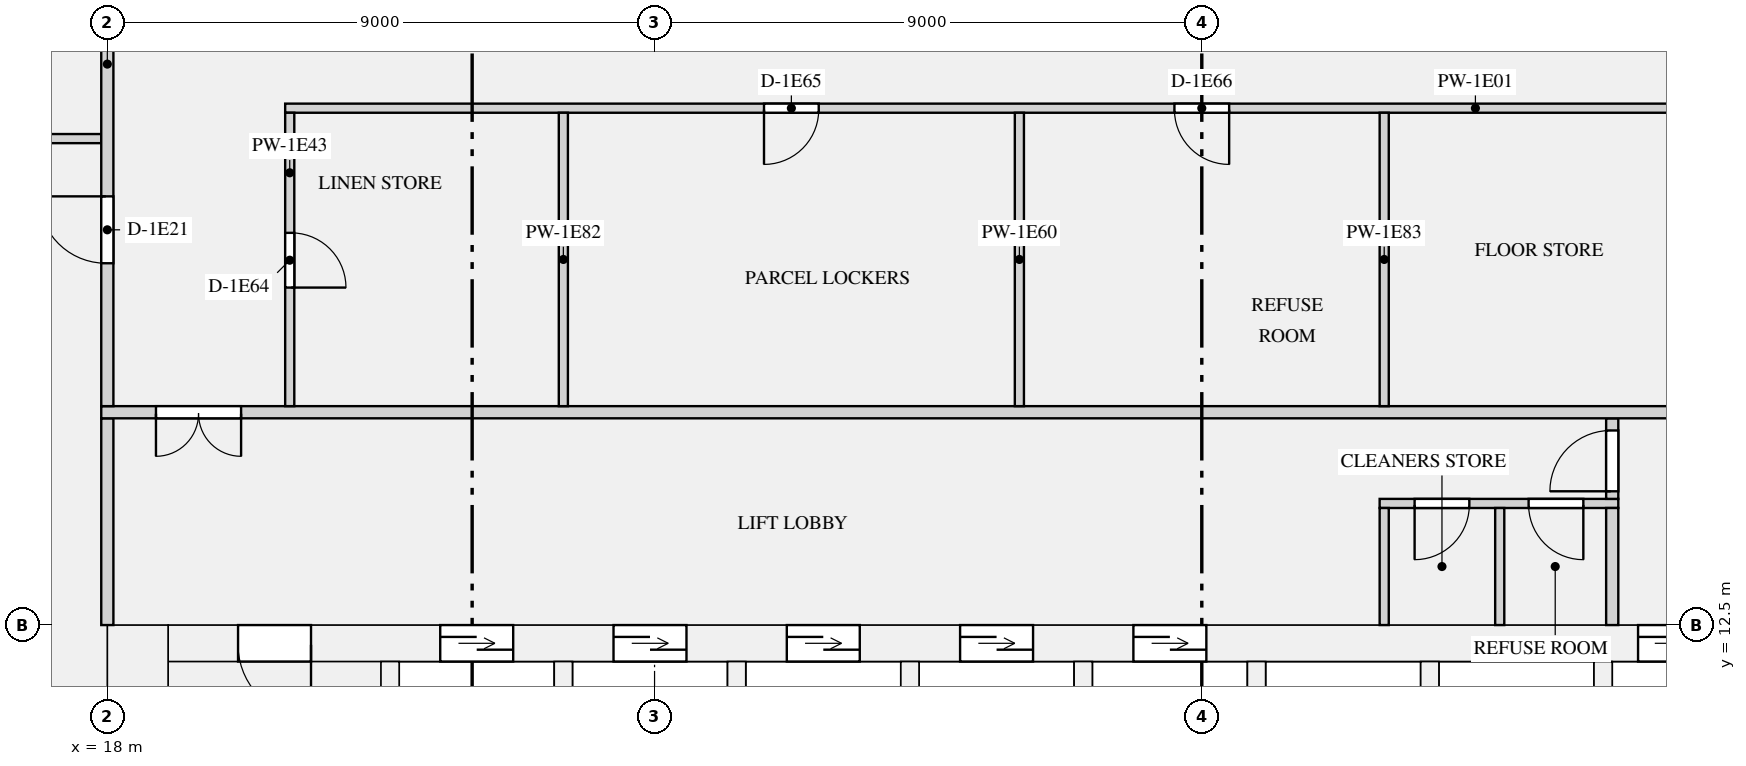
"""IFC4 building model, lengths in metres.
Left out: names, types, materials, properties, quantities, classifications, styles, units other than length and angle.
Written with IfcOpenShell. Run it as: python <this file> out.ifc"""

import sys

from ifc_helpers import new_model, si_unit, direction, frame, frame_2d, origin, place, context, subcontext, project, spatial, rectangle, extrude, element, fill, save


model = new_model("IFC4")
c1 = context("Model", 3, precision=1e-05, world=origin(), true_north=direction((0.0, 1.0)))
c2 = subcontext(c1, "Body", "Model", "MODEL_VIEW")
j1 = project(units=[si_unit("LENGTHUNIT", "METRE"), si_unit("PLANEANGLEUNIT", "RADIAN")], contexts=[c1])
p1 = place(None, origin())
s1 = spatial("IfcSite", under=j1, at=p1, CompositionType="ELEMENT")
p2 = place(p1, origin())
s2 = spatial("IfcBuilding", under=s1, at=p2, CompositionType="ELEMENT")
p3 = place(p2, frame((0.0, 0.0, 54.15)))
s3 = spatial("IfcBuildingStorey", under=s2, at=p3, CompositionType="ELEMENT", Elevation=54.15)
p4 = place(p3, frame((18.5, 0.0, 0.0), z_axis=(0.0, 0.0, 1.0), x_axis=(0.0, 1.0, 0.0)))
e1 = element("IfcWall", 1, at=p4, inside=s3, PredefinedType="SHEAR", context=c2, shape_type="SweptSolid", body=[
    extrude(rectangle(XDim=12.5, YDim=1.0, at=frame_2d((6.25, 0.0))), origin(), (0.0, 0.0, 1.0), 3.15),
])
p5 = place(p3, frame((19.0, 12.2, 0.0), z_axis=(0.0, 0.0, 1.0), x_axis=(1.0, 0.0, 0.0)))
e2 = element("IfcWall", 2, at=p5, inside=s3, PredefinedType="SHEAR", context=c2, shape_type="SweptSolid", body=[
    extrude(rectangle(XDim=34.0, YDim=0.6, at=frame_2d((17.0, 0.0))), origin(), (0.0, 0.0, 1.0), 3.15),
])
p6 = place(p5, frame((4.475, 0.0, 0.0)))
e3 = element("IfcOpeningElement", 3, at=p6, cuts=e2, PredefinedType="OPENING", context=c2, shape_type="SweptSolid", body=[
    extrude(rectangle(XDim=1.2, YDim=2.1, at=frame_2d((0.6, 1.05))), frame((0.0, 0.31, 0.0), z_axis=(0.0, -1.0, 0.0), x_axis=(1.0, 0.0, 0.0)), (0.0, 0.0, 1.0), 0.62),
])
p7 = place(p5, frame((7.325, 0.0, 0.0)))
e4 = element("IfcOpeningElement", 4, at=p7, cuts=e2, PredefinedType="OPENING", context=c2, shape_type="SweptSolid", body=[
    extrude(rectangle(XDim=1.2, YDim=2.1, at=frame_2d((0.6, 1.05))), frame((0.0, 0.31, 0.0), z_axis=(0.0, -1.0, 0.0), x_axis=(1.0, 0.0, 0.0)), (0.0, 0.0, 1.0), 0.62),
])
p8 = place(p5, frame((10.175, 0.0, 0.0)))
e5 = element("IfcOpeningElement", 5, at=p8, cuts=e2, PredefinedType="OPENING", context=c2, shape_type="SweptSolid", body=[
    extrude(rectangle(XDim=1.2, YDim=2.1, at=frame_2d((0.6, 1.05))), frame((0.0, 0.31, 0.0), z_axis=(0.0, -1.0, 0.0), x_axis=(1.0, 0.0, 0.0)), (0.0, 0.0, 1.0), 0.62),
])
p9 = place(p5, frame((13.025, 0.0, 0.0)))
e6 = element("IfcOpeningElement", 6, at=p9, cuts=e2, PredefinedType="OPENING", context=c2, shape_type="SweptSolid", body=[
    extrude(rectangle(XDim=1.2, YDim=2.1, at=frame_2d((0.6, 1.05))), frame((0.0, 0.31, 0.0), z_axis=(0.0, -1.0, 0.0), x_axis=(1.0, 0.0, 0.0)), (0.0, 0.0, 1.0), 0.62),
])
p10 = place(p5, frame((15.875, 0.0, 0.0)))
e7 = element("IfcOpeningElement", 7, at=p10, cuts=e2, PredefinedType="OPENING", context=c2, shape_type="SweptSolid", body=[
    extrude(rectangle(XDim=1.2, YDim=2.1, at=frame_2d((0.6, 1.05))), frame((0.0, 0.31, 0.0), z_axis=(0.0, -1.0, 0.0), x_axis=(1.0, 0.0, 0.0)), (0.0, 0.0, 1.0), 0.62),
])
p11 = place(p5, frame((24.175, 0.0, 0.0)))
e8 = element("IfcOpeningElement", 8, at=p11, cuts=e2, PredefinedType="OPENING", context=c2, shape_type="SweptSolid", body=[
    extrude(rectangle(XDim=1.1, YDim=2.1, at=frame_2d((0.55, 1.05))), frame((0.0, 0.31, 0.0), z_axis=(0.0, -1.0, 0.0), x_axis=(1.0, 0.0, 0.0)), (0.0, 0.0, 1.0), 0.62),
])
p12 = place(p5, frame((26.425, 0.0, 0.0)))
e9 = element("IfcOpeningElement", 9, at=p12, cuts=e2, PredefinedType="OPENING", context=c2, shape_type="SweptSolid", body=[
    extrude(rectangle(XDim=1.1, YDim=2.1, at=frame_2d((0.55, 1.05))), frame((0.0, 0.31, 0.0), z_axis=(0.0, -1.0, 0.0), x_axis=(1.0, 0.0, 0.0)), (0.0, 0.0, 1.0), 0.62),
])
p13 = place(p5, frame((28.675, 0.0, 0.0)))
e10 = element("IfcOpeningElement", 10, at=p13, cuts=e2, PredefinedType="OPENING", context=c2, shape_type="SweptSolid", body=[
    extrude(rectangle(XDim=1.1, YDim=2.1, at=frame_2d((0.55, 1.05))), frame((0.0, 0.31, 0.0), z_axis=(0.0, -1.0, 0.0), x_axis=(1.0, 0.0, 0.0)), (0.0, 0.0, 1.0), 0.62),
])
p14 = place(p5, frame((1.15, 0.0, 0.0)))
e11 = element("IfcOpeningElement", 11, at=p14, cuts=e2, PredefinedType="OPENING", context=c2, shape_type="SweptSolid", body=[
    extrude(rectangle(XDim=1.2, YDim=2.1, at=frame_2d((0.6, 1.05))), frame((0.0, 0.31, 0.0), z_axis=(0.0, -1.0, 0.0), x_axis=(1.0, 0.0, 0.0)), (0.0, 0.0, 1.0), 0.62),
])
p15 = place(p5, frame((31.65, 0.0, 0.0)))
e12 = element("IfcOpeningElement", 12, at=p15, cuts=e2, PredefinedType="OPENING", context=c2, shape_type="SweptSolid", body=[
    extrude(rectangle(XDim=1.2, YDim=2.1, at=frame_2d((0.6, 1.05))), frame((0.0, 0.31, 0.0), z_axis=(0.0, -1.0, 0.0), x_axis=(1.0, 0.0, 0.0)), (0.0, 0.0, 1.0), 0.62),
])
for number, where, z_axis, x_axis in (
    (13, (22.65, 9.35, 0.0), (0.0, 0.0, 1.0), (0.0, 1.0, 0.0)),
    (14, (25.5, 9.35, 0.0), (0.0, 0.0, 1.0), (0.0, 1.0, 0.0)),
    (15, (28.35, 9.35, 0.0), (0.0, 0.0, 1.0), (0.0, 1.0, 0.0)),
    (16, (31.2, 9.35, 0.0), (0.0, 0.0, 1.0), (0.0, 1.0, 0.0)),
    (17, (34.05, 9.35, 0.0), (0.0, 0.0, 1.0), (0.0, 1.0, 0.0)),
    (18, (36.9, 9.35, 0.0), (0.0, 0.0, 1.0), (0.0, 1.0, 0.0)),
    (19, (39.75, 9.35, 0.0), (0.0, 0.0, 1.0), (0.0, 1.0, 0.0)),
):
    element("IfcWall", number, at=place(p3, frame(where, z_axis=z_axis, x_axis=x_axis)), inside=s3, PredefinedType="SHEAR", context=c2, shape_type="SweptSolid", body=[
        extrude(rectangle(XDim=2.55, YDim=0.3, at=frame_2d((1.275, 0.0))), origin(), (0.0, 0.0, 1.0), 3.15),
    ])
p16 = place(p3, frame((42.6, 8.25, 0.0), z_axis=(0.0, 0.0, 1.0), x_axis=(0.0, 1.0, 0.0)))
e20 = element("IfcWall", 20, at=p16, inside=s3, PredefinedType="SHEAR", context=c2, shape_type="SweptSolid", body=[
    extrude(rectangle(XDim=3.65, YDim=0.3, at=frame_2d((1.825, 0.0))), origin(), (0.0, 0.0, 1.0), 3.15),
])
p17 = place(p3, frame((38.925, 14.5, 0.0), z_axis=(0.0, 0.0, 1.0), x_axis=(1.0, 0.0, 0.0)))
e21 = element("IfcWall", 21, at=p17, inside=s3, PredefinedType="PARTITIONING", context=c2, shape_type="SweptSolid", body=[
    extrude(rectangle(XDim=3.925, YDim=0.15, at=frame_2d((1.962, 0.0))), origin(), (0.0, 0.0, 1.0), 2.83),
])
p18 = place(p17, frame((0.575, 0.0, 0.0)))
e22 = element("IfcOpeningElement", 22, at=p18, cuts=e21, PredefinedType="OPENING", context=c2, shape_type="SweptSolid", body=[
    extrude(rectangle(XDim=0.9, YDim=2.1, at=frame_2d((0.45, 1.05))), frame((0.0, 0.085, 0.0), z_axis=(0.0, -1.0, 0.0), x_axis=(1.0, 0.0, 0.0)), (0.0, 0.0, 1.0), 0.17),
])
p19 = place(p17, frame((2.45, 0.0, 0.0)))
e23 = element("IfcOpeningElement", 23, at=p19, cuts=e21, PredefinedType="OPENING", context=c2, shape_type="SweptSolid", body=[
    extrude(rectangle(XDim=0.9, YDim=2.1, at=frame_2d((0.45, 1.05))), frame((0.0, 0.085, 0.0), z_axis=(0.0, -1.0, 0.0), x_axis=(1.0, 0.0, 0.0)), (0.0, 0.0, 1.0), 0.17),
])
p20 = place(p3, frame((18.0, 12.5, 0.0), z_axis=(0.0, 0.0, 1.0), x_axis=(0.0, 1.0, 0.0)))
e24 = element("IfcWall", 24, at=p20, inside=s3, PredefinedType="PARTITIONING", context=c2, shape_type="SweptSolid", body=[
    extrude(rectangle(XDim=3.4, YDim=0.2, at=frame_2d((1.7, 0.0))), origin(), (0.0, 0.0, 1.0), 2.83),
])
for number, where, z_axis, x_axis in (
    (25, (39.0, 12.5, 0.0), (0.0, 0.0, 1.0), (0.0, 1.0, 0.0)),
    (26, (40.9, 12.5, 0.0), (0.0, 0.0, 1.0), (0.0, 1.0, 0.0)),
):
    element("IfcWall", number, at=place(p3, frame(where, z_axis=z_axis, x_axis=x_axis)), inside=s3, PredefinedType="PARTITIONING", context=c2, shape_type="SweptSolid", body=[
        extrude(rectangle(XDim=1.925, YDim=0.15, at=frame_2d((0.962, 0.0))), origin(), (0.0, 0.0, 1.0), 2.83),
    ])
p21 = place(p3, frame((42.75, 12.5, 0.0), z_axis=(0.0, 0.0, 1.0), x_axis=(0.0, 1.0, 0.0)))
e27 = element("IfcWall", 27, at=p21, inside=s3, PredefinedType="PARTITIONING", context=c2, shape_type="SweptSolid", body=[
    extrude(rectangle(XDim=1.925, YDim=0.2, at=frame_2d((0.962, 0.0))), origin(), (0.0, 0.0, 1.0), 2.83),
])
p22 = place(p3, frame((42.75, 14.575, 0.0), z_axis=(0.0, 0.0, 1.0), x_axis=(0.0, 1.0, 0.0)))
e28 = element("IfcWall", 28, at=p22, inside=s3, PredefinedType="PARTITIONING", context=c2, shape_type="SweptSolid", body=[
    extrude(rectangle(XDim=1.325, YDim=0.2, at=frame_2d((0.663, 0.0))), origin(), (0.0, 0.0, 1.0), 2.83),
])
p23 = place(p22, frame((0.125, 0.0, 0.0)))
e29 = element("IfcOpeningElement", 29, at=p23, cuts=e28, PredefinedType="OPENING", context=c2, shape_type="SweptSolid", body=[
    extrude(rectangle(XDim=1.0, YDim=2.1, at=frame_2d((0.5, 1.05))), frame((0.0, 0.11, 0.0), z_axis=(0.0, -1.0, 0.0), x_axis=(1.0, 0.0, 0.0)), (0.0, 0.0, 1.0), 0.22),
])
p24 = place(p3, frame((20.925, 21.0, 0.0), z_axis=(0.0, 0.0, 1.0), x_axis=(1.0, 0.0, 0.0)))
e30 = element("IfcWall", 30, at=p24, inside=s3, PredefinedType="PARTITIONING", context=c2, shape_type="SweptSolid", body=[
    extrude(rectangle(XDim=30.15, YDim=0.15, at=frame_2d((15.075, 0.0))), origin(), (0.0, 0.0, 1.0), 2.83),
])
p25 = place(p24, frame((7.875, 0.0, 0.0)))
e31 = element("IfcOpeningElement", 31, at=p25, cuts=e30, PredefinedType="OPENING", context=c2, shape_type="SweptSolid", body=[
    extrude(rectangle(XDim=0.9, YDim=2.1, at=frame_2d((0.45, 1.05))), frame((0.0, 0.085, 0.0), z_axis=(0.0, -1.0, 0.0), x_axis=(1.0, 0.0, 0.0)), (0.0, 0.0, 1.0), 0.17),
])
p26 = place(p24, frame((14.625, 0.0, 0.0)))
e32 = element("IfcOpeningElement", 32, at=p26, cuts=e30, PredefinedType="OPENING", context=c2, shape_type="SweptSolid", body=[
    extrude(rectangle(XDim=0.9, YDim=2.1, at=frame_2d((0.45, 1.05))), frame((0.0, 0.085, 0.0), z_axis=(0.0, -1.0, 0.0), x_axis=(1.0, 0.0, 0.0)), (0.0, 0.0, 1.0), 0.17),
])
p27 = place(p24, frame((23.625, 0.0, 0.0)))
e33 = element("IfcOpeningElement", 33, at=p27, cuts=e30, PredefinedType="OPENING", context=c2, shape_type="SweptSolid", body=[
    extrude(rectangle(XDim=0.9, YDim=2.1, at=frame_2d((0.45, 1.05))), frame((0.0, 0.085, 0.0), z_axis=(0.0, -1.0, 0.0), x_axis=(1.0, 0.0, 0.0)), (0.0, 0.0, 1.0), 0.17),
])
p28 = place(p3, frame((13.575, 20.5, 0.0), z_axis=(0.0, 0.0, 1.0), x_axis=(1.0, 0.0, 0.0)))
e34 = element("IfcWall", 34, at=p28, inside=s3, PredefinedType="PARTITIONING", context=c2, shape_type="SweptSolid", body=[
    extrude(rectangle(XDim=4.325, YDim=0.15, at=frame_2d((2.163, 0.0))), origin(), (0.0, 0.0, 1.0), 2.83),
])
p29 = place(p28, frame((1.725, 0.0, 0.0)))
e35 = element("IfcOpeningElement", 35, at=p29, cuts=e34, PredefinedType="OPENING", context=c2, shape_type="SweptSolid", body=[
    extrude(rectangle(XDim=0.9, YDim=2.1, at=frame_2d((0.45, 1.05))), frame((0.0, 0.085, 0.0), z_axis=(0.0, -1.0, 0.0), x_axis=(1.0, 0.0, 0.0)), (0.0, 0.0, 1.0), 0.17),
])
p30 = place(p3, frame((17.9, 16.0, 0.0), z_axis=(0.0, 0.0, 1.0), x_axis=(1.0, 0.0, 0.0)))
e36 = element("IfcWall", 36, at=p30, inside=s3, PredefinedType="PARTITIONING", context=c2, shape_type="SweptSolid", body=[
    extrude(rectangle(XDim=36.2, YDim=0.2, at=frame_2d((18.1, 0.0))), origin(), (0.0, 0.0, 1.0), 2.83),
])
p31 = place(p30, frame((0.9, 0.0, 0.0)))
e37 = element("IfcOpeningElement", 37, at=p31, cuts=e36, PredefinedType="OPENING", context=c2, shape_type="SweptSolid", body=[
    extrude(rectangle(XDim=1.4, YDim=2.1, at=frame_2d((0.7, 1.05))), frame((0.0, 0.11, 0.0), z_axis=(0.0, -1.0, 0.0), x_axis=(1.0, 0.0, 0.0)), (0.0, 0.0, 1.0), 0.22),
])
p32 = place(p30, frame((33.9, 0.0, 0.0)))
e38 = element("IfcOpeningElement", 38, at=p32, cuts=e36, PredefinedType="OPENING", context=c2, shape_type="SweptSolid", body=[
    extrude(rectangle(XDim=1.4, YDim=2.1, at=frame_2d((0.7, 1.05))), frame((0.0, 0.11, 0.0), z_axis=(0.0, -1.0, 0.0), x_axis=(1.0, 0.0, 0.0)), (0.0, 0.0, 1.0), 0.22),
])
p33 = place(p3, frame((18.0, 16.1, 0.0), z_axis=(0.0, 0.0, 1.0), x_axis=(0.0, 1.0, 0.0)))
e39 = element("IfcWall", 39, at=p33, inside=s3, PredefinedType="PARTITIONING", context=c2, shape_type="SweptSolid", body=[
    extrude(rectangle(XDim=7.8, YDim=0.2, at=frame_2d((3.9, 0.0))), origin(), (0.0, 0.0, 1.0), 2.83),
])
p34 = place(p33, frame((2.35, 0.0, 0.0)))
e40 = element("IfcOpeningElement", 40, at=p34, cuts=e39, PredefinedType="OPENING", context=c2, shape_type="SweptSolid", body=[
    extrude(rectangle(XDim=1.1, YDim=2.1, at=frame_2d((0.55, 1.05))), frame((0.0, 0.11, 0.0), z_axis=(0.0, -1.0, 0.0), x_axis=(1.0, 0.0, 0.0)), (0.0, 0.0, 1.0), 0.22),
])
p35 = place(p3, frame((21.0, 16.1, 0.0), z_axis=(0.0, 0.0, 1.0), x_axis=(0.0, 1.0, 0.0)))
e41 = element("IfcWall", 41, at=p35, inside=s3, PredefinedType="PARTITIONING", context=c2, shape_type="SweptSolid", body=[
    extrude(rectangle(XDim=4.825, YDim=0.15, at=frame_2d((2.413, 0.0))), origin(), (0.0, 0.0, 1.0), 2.83),
])
p36 = place(p35, frame((1.95, 0.0, 0.0)))
e42 = element("IfcOpeningElement", 42, at=p36, cuts=e41, PredefinedType="OPENING", context=c2, shape_type="SweptSolid", body=[
    extrude(rectangle(XDim=0.9, YDim=2.1, at=frame_2d((0.45, 1.05))), frame((0.0, 0.085, 0.0), z_axis=(0.0, -1.0, 0.0), x_axis=(1.0, 0.0, 0.0)), (0.0, 0.0, 1.0), 0.17),
])
for number, where, z_axis, x_axis in (
    (43, (33.0, 16.1, 0.0), (0.0, 0.0, 1.0), (0.0, 1.0, 0.0)),
    (44, (25.5, 16.1, 0.0), (0.0, 0.0, 1.0), (0.0, 1.0, 0.0)),
    (45, (39.0, 16.1, 0.0), (0.0, 0.0, 1.0), (0.0, 1.0, 0.0)),
):
    element("IfcWall", number, at=place(p3, frame(where, z_axis=z_axis, x_axis=x_axis)), inside=s3, PredefinedType="PARTITIONING", context=c2, shape_type="SweptSolid", body=[
        extrude(rectangle(XDim=4.825, YDim=0.15, at=frame_2d((2.413, 0.0))), origin(), (0.0, 0.0, 1.0), 2.83),
    ])
p37 = place(p6, origin())
e46 = element("IfcDoor", 46, at=p37, inside=s3, OperationType="DOUBLE_DOOR_SLIDING", PredefinedType="DOOR", context=c2, shape_type="SweptSolid", body=[
    extrude(rectangle(XDim=1.2, YDim=2.1, at=frame_2d((0.6, 1.05))), frame((0.0, 0.025, 0.0), z_axis=(0.0, -1.0, 0.0), x_axis=(1.0, 0.0, 0.0)), (0.0, 0.0, 1.0), 0.05),
])
fill(e3, e46)
p38 = place(p7, origin())
e47 = element("IfcDoor", 47, at=p38, inside=s3, OperationType="DOUBLE_DOOR_SLIDING", PredefinedType="DOOR", context=c2, shape_type="SweptSolid", body=[
    extrude(rectangle(XDim=1.2, YDim=2.1, at=frame_2d((0.6, 1.05))), frame((0.0, 0.025, 0.0), z_axis=(0.0, -1.0, 0.0), x_axis=(1.0, 0.0, 0.0)), (0.0, 0.0, 1.0), 0.05),
])
fill(e4, e47)
p39 = place(p8, origin())
e48 = element("IfcDoor", 48, at=p39, inside=s3, OperationType="DOUBLE_DOOR_SLIDING", PredefinedType="DOOR", context=c2, shape_type="SweptSolid", body=[
    extrude(rectangle(XDim=1.2, YDim=2.1, at=frame_2d((0.6, 1.05))), frame((0.0, 0.025, 0.0), z_axis=(0.0, -1.0, 0.0), x_axis=(1.0, 0.0, 0.0)), (0.0, 0.0, 1.0), 0.05),
])
fill(e5, e48)
p40 = place(p9, origin())
e49 = element("IfcDoor", 49, at=p40, inside=s3, OperationType="DOUBLE_DOOR_SLIDING", PredefinedType="DOOR", context=c2, shape_type="SweptSolid", body=[
    extrude(rectangle(XDim=1.2, YDim=2.1, at=frame_2d((0.6, 1.05))), frame((0.0, 0.025, 0.0), z_axis=(0.0, -1.0, 0.0), x_axis=(1.0, 0.0, 0.0)), (0.0, 0.0, 1.0), 0.05),
])
fill(e6, e49)
p41 = place(p10, origin())
e50 = element("IfcDoor", 50, at=p41, inside=s3, OperationType="DOUBLE_DOOR_SLIDING", PredefinedType="DOOR", context=c2, shape_type="SweptSolid", body=[
    extrude(rectangle(XDim=1.2, YDim=2.1, at=frame_2d((0.6, 1.05))), frame((0.0, 0.025, 0.0), z_axis=(0.0, -1.0, 0.0), x_axis=(1.0, 0.0, 0.0)), (0.0, 0.0, 1.0), 0.05),
])
fill(e7, e50)
p42 = place(p11, origin())
e51 = element("IfcDoor", 51, at=p42, inside=s3, OperationType="DOUBLE_DOOR_SLIDING", PredefinedType="DOOR", context=c2, shape_type="SweptSolid", body=[
    extrude(rectangle(XDim=1.1, YDim=2.1, at=frame_2d((0.55, 1.05))), frame((0.0, 0.025, 0.0), z_axis=(0.0, -1.0, 0.0), x_axis=(1.0, 0.0, 0.0)), (0.0, 0.0, 1.0), 0.05),
])
fill(e8, e51)
p43 = place(p18, frame((0.9, 0.0, 0.0), z_axis=(0.0, 0.0, 1.0), x_axis=(-1.0, 0.0, 0.0)))
e52 = element("IfcDoor", 52, at=p43, inside=s3, OperationType="SINGLE_SWING_RIGHT", PredefinedType="DOOR", context=c2, shape_type="SweptSolid", body=[
    extrude(rectangle(XDim=0.9, YDim=2.1, at=frame_2d((0.45, 1.05))), frame((0.0, 0.025, 0.0), z_axis=(0.0, -1.0, 0.0), x_axis=(1.0, 0.0, 0.0)), (0.0, 0.0, 1.0), 0.05),
])
fill(e22, e52)
p44 = place(p19, frame((0.9, 0.0, 0.0), z_axis=(0.0, 0.0, 1.0), x_axis=(-1.0, 0.0, 0.0)))
e53 = element("IfcDoor", 53, at=p44, inside=s3, OperationType="SINGLE_SWING_LEFT", PredefinedType="DOOR", context=c2, shape_type="SweptSolid", body=[
    extrude(rectangle(XDim=0.9, YDim=2.1, at=frame_2d((0.45, 1.05))), frame((0.0, 0.025, 0.0), z_axis=(0.0, -1.0, 0.0), x_axis=(1.0, 0.0, 0.0)), (0.0, 0.0, 1.0), 0.05),
])
fill(e23, e53)
p45 = place(p14, frame((1.2, 0.0, 0.0), z_axis=(0.0, 0.0, 1.0), x_axis=(-1.0, 0.0, 0.0)))
e54 = element("IfcDoor", 54, at=p45, inside=s3, OperationType="SINGLE_SWING_LEFT", PredefinedType="DOOR", context=c2, shape_type="SweptSolid", body=[
    extrude(rectangle(XDim=1.2, YDim=2.1, at=frame_2d((0.6, 1.05))), frame((0.0, 0.025, 0.0), z_axis=(0.0, -1.0, 0.0), x_axis=(1.0, 0.0, 0.0)), (0.0, 0.0, 1.0), 0.05),
])
fill(e11, e54)
p46 = place(p23, origin())
e55 = element("IfcDoor", 55, at=p46, inside=s3, OperationType="SINGLE_SWING_LEFT", PredefinedType="DOOR", context=c2, shape_type="SweptSolid", body=[
    extrude(rectangle(XDim=1.0, YDim=2.1, at=frame_2d((0.5, 1.05))), frame((0.0, 0.025, 0.0), z_axis=(0.0, -1.0, 0.0), x_axis=(1.0, 0.0, 0.0)), (0.0, 0.0, 1.0), 0.05),
])
fill(e29, e55)
p47 = place(p31, frame((1.4, 0.0, 0.0), z_axis=(0.0, 0.0, 1.0), x_axis=(-1.0, 0.0, 0.0)))
e56 = element("IfcDoor", 56, at=p47, inside=s3, OperationType="DOUBLE_DOOR_SINGLE_SWING", PredefinedType="DOOR", context=c2, shape_type="SweptSolid", body=[
    extrude(rectangle(XDim=1.4, YDim=2.1, at=frame_2d((0.7, 1.05))), frame((0.0, 0.025, 0.0), z_axis=(0.0, -1.0, 0.0), x_axis=(1.0, 0.0, 0.0)), (0.0, 0.0, 1.0), 0.05),
])
fill(e37, e56)
p48 = place(p34, origin())
e57 = element("IfcDoor", 57, at=p48, inside=s3, OperationType="SINGLE_SWING_RIGHT", PredefinedType="DOOR", context=c2, shape_type="SweptSolid", body=[
    extrude(rectangle(XDim=1.1, YDim=2.1, at=frame_2d((0.55, 1.05))), frame((0.0, 0.025, 0.0), z_axis=(0.0, -1.0, 0.0), x_axis=(1.0, 0.0, 0.0)), (0.0, 0.0, 1.0), 0.05),
])
fill(e40, e57)
p49 = place(p36, frame((0.9, 0.0, 0.0), z_axis=(0.0, 0.0, 1.0), x_axis=(-1.0, 0.0, 0.0)))
e58 = element("IfcDoor", 58, at=p49, inside=s3, OperationType="SINGLE_SWING_RIGHT", PredefinedType="DOOR", context=c2, shape_type="SweptSolid", body=[
    extrude(rectangle(XDim=0.9, YDim=2.1, at=frame_2d((0.45, 1.05))), frame((0.0, 0.025, 0.0), z_axis=(0.0, -1.0, 0.0), x_axis=(1.0, 0.0, 0.0)), (0.0, 0.0, 1.0), 0.05),
])
fill(e42, e58)
p50 = place(p25, frame((0.9, 0.0, 0.0), z_axis=(0.0, 0.0, 1.0), x_axis=(-1.0, 0.0, 0.0)))
e59 = element("IfcDoor", 59, at=p50, inside=s3, OperationType="SINGLE_SWING_RIGHT", PredefinedType="DOOR", context=c2, shape_type="SweptSolid", body=[
    extrude(rectangle(XDim=0.9, YDim=2.1, at=frame_2d((0.45, 1.05))), frame((0.0, 0.025, 0.0), z_axis=(0.0, -1.0, 0.0), x_axis=(1.0, 0.0, 0.0)), (0.0, 0.0, 1.0), 0.05),
])
fill(e31, e59)
p51 = place(p26, frame((0.9, 0.0, 0.0), z_axis=(0.0, 0.0, 1.0), x_axis=(-1.0, 0.0, 0.0)))
e60 = element("IfcDoor", 60, at=p51, inside=s3, OperationType="SINGLE_SWING_LEFT", PredefinedType="DOOR", context=c2, shape_type="SweptSolid", body=[
    extrude(rectangle(XDim=0.9, YDim=2.1, at=frame_2d((0.45, 1.05))), frame((0.0, 0.025, 0.0), z_axis=(0.0, -1.0, 0.0), x_axis=(1.0, 0.0, 0.0)), (0.0, 0.0, 1.0), 0.05),
])
fill(e32, e60)
save(model, sys.argv[1])
